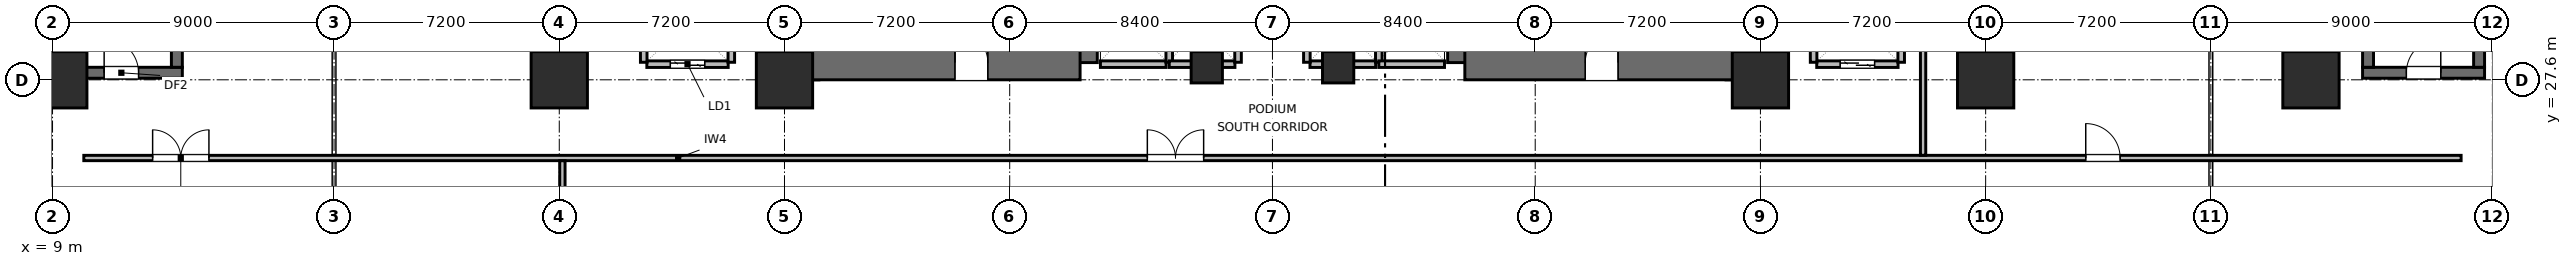
"""IFC4 building model, lengths in metres.
Left out: names, types, materials, properties, quantities, classifications, styles, units other than length and angle.
Written with IfcOpenShell. Run it as: python <this file> out.ifc"""

import sys

from ifc_helpers import new_model, si_unit, direction, frame, frame_2d, origin, origin_2d, place, context, subcontext, project, spatial, rectangle, extrude, element, fill, save


model = new_model("IFC4")
c1 = context("Model", 3, precision=1e-05, world=origin(), true_north=direction((0.0, 1.0)))
c2 = subcontext(c1, "Body", "Model", "MODEL_VIEW")
j1 = project(units=[si_unit("LENGTHUNIT", "METRE"), si_unit("PLANEANGLEUNIT", "RADIAN")], contexts=[c1])
p1 = place(None, origin())
s1 = spatial("IfcSite", under=j1, at=p1, CompositionType="ELEMENT")
p2 = place(p1, origin())
s2 = spatial("IfcBuilding", under=s1, at=p2, CompositionType="ELEMENT")
p3 = place(p2, frame((0.0, 0.0, 12.9)))
s3 = spatial("IfcBuildingStorey", under=s2, at=p3, CompositionType="ELEMENT", Elevation=12.9)
p4 = place(p3, frame((32.95, 27.6, 0.0), z_axis=(0.0, 0.0, 1.0), x_axis=(0.0, 1.0, 0.0)))
e1 = element("IfcWall", 1, at=p4, inside=s3, PredefinedType="SHEAR", context=c2, shape_type="SweptSolid", body=[
    extrude(rectangle(XDim=16.8, YDim=1.1, at=frame_2d((8.4, 0.0))), origin(), (0.0, 0.0, 1.0), 4.2),
])
p5 = place(p3, frame((41.85, 28.15, 0.0), z_axis=(0.0, 0.0, 1.0), x_axis=(0.0, 1.0, 0.0)))
e2 = element("IfcWall", 2, at=p5, inside=s3, PredefinedType="SHEAR", context=c2, shape_type="SweptSolid", body=[
    extrude(rectangle(XDim=6.25, YDim=1.1, at=frame_2d((3.125, 0.0))), origin(), (0.0, 0.0, 1.0), 4.2),
])
p6 = place(p3, frame((32.95, 28.15, 0.0), z_axis=(0.0, 0.0, 1.0), x_axis=(1.0, 0.0, 0.0)))
e3 = element("IfcWall", 3, at=p6, inside=s3, PredefinedType="SHEAR", context=c2, shape_type="SweptSolid", body=[
    extrude(rectangle(XDim=8.9, YDim=1.1, at=frame_2d((4.45, 0.0))), origin(), (0.0, 0.0, 1.0), 4.2),
])
p7 = place(p6, frame((4.9, 0.0, 0.0)))
e4 = element("IfcOpeningElement", 4, at=p7, cuts=e3, PredefinedType="OPENING", context=c2, shape_type="SweptSolid", body=[
    extrude(rectangle(XDim=1.05, YDim=2.04, at=frame_2d((0.525, 1.02))), frame((0.0, 0.56, 0.0), z_axis=(0.0, -1.0, 0.0), x_axis=(1.0, 0.0, 0.0)), (0.0, 0.0, 1.0), 1.12),
])
p8 = place(p3, frame((54.15, 28.15, 0.0), z_axis=(0.0, 0.0, 1.0), x_axis=(0.0, 1.0, 0.0)))
e5 = element("IfcWall", 5, at=p8, inside=s3, PredefinedType="SHEAR", context=c2, shape_type="SweptSolid", body=[
    extrude(rectangle(XDim=7.65, YDim=1.1, at=frame_2d((3.825, 0.0))), origin(), (0.0, 0.0, 1.0), 4.2),
])
p9 = place(p3, frame((63.05, 27.6, 0.0), z_axis=(0.0, 0.0, 1.0), x_axis=(0.0, 1.0, 0.0)))
e6 = element("IfcWall", 6, at=p9, inside=s3, PredefinedType="SHEAR", context=c2, shape_type="SweptSolid", body=[
    extrude(rectangle(XDim=16.8, YDim=1.1, at=frame_2d((8.4, 0.0))), origin(), (0.0, 0.0, 1.0), 4.2),
])
p10 = place(p3, frame((54.15, 28.15, 0.0), z_axis=(0.0, 0.0, 1.0), x_axis=(1.0, 0.0, 0.0)))
e7 = element("IfcWall", 7, at=p10, inside=s3, PredefinedType="SHEAR", context=c2, shape_type="SweptSolid", body=[
    extrude(rectangle(XDim=8.9, YDim=1.1, at=frame_2d((4.45, 0.0))), origin(), (0.0, 0.0, 1.0), 4.2),
])
p11 = place(p10, frame((3.85, 0.0, 0.0)))
e8 = element("IfcOpeningElement", 8, at=p11, cuts=e7, PredefinedType="OPENING", context=c2, shape_type="SweptSolid", body=[
    extrude(rectangle(XDim=1.05, YDim=2.04, at=frame_2d((0.525, 1.02))), frame((0.0, 0.56, 0.0), z_axis=(0.0, -1.0, 0.0), x_axis=(1.0, 0.0, 0.0)), (0.0, 0.0, 1.0), 1.12),
])
p12 = place(p3, frame((9.25, 27.825, 0.0), z_axis=(0.0, 0.0, 1.0), x_axis=(1.0, 0.0, 0.0)))
e9 = element("IfcWall", 9, at=p12, inside=s3, PredefinedType="SHEAR", context=c2, shape_type="SweptSolid", body=[
    extrude(rectangle(XDim=3.9, YDim=0.35, at=frame_2d((1.95, 0.0))), origin(), (0.0, 0.0, 1.0), 4.2),
])
p13 = place(p12, frame((1.4, 0.0, 0.0)))
e10 = element("IfcOpeningElement", 10, at=p13, cuts=e9, PredefinedType="OPENING", context=c2, shape_type="SweptSolid", body=[
    extrude(rectangle(XDim=1.1, YDim=2.05, at=frame_2d((0.55, 1.025))), frame((0.0, 0.185, 0.0), z_axis=(0.0, -1.0, 0.0), x_axis=(1.0, 0.0, 0.0)), (0.0, 0.0, 1.0), 0.37),
])
for number, where, z_axis, x_axis in (
    (11, (9.425, 28.0, 0.0), (0.0, 0.0, 1.0), (0.0, 1.0, 0.0)),
    (12, (12.975, 28.0, 0.0), (0.0, 0.0, 1.0), (0.0, 1.0, 0.0)),
):
    element("IfcWall", number, at=place(p3, frame(where, z_axis=z_axis, x_axis=x_axis)), inside=s3, PredefinedType="SHEAR", context=c2, shape_type="SweptSolid", body=[
        extrude(rectangle(XDim=8.4, YDim=0.35, at=frame_2d((4.2, 0.0))), origin(), (0.0, 0.0, 1.0), 4.2),
    ])
p14 = place(p3, frame((82.85, 27.825, 0.0), z_axis=(0.0, 0.0, 1.0), x_axis=(1.0, 0.0, 0.0)))
e13 = element("IfcWall", 13, at=p14, inside=s3, PredefinedType="SHEAR", context=c2, shape_type="SweptSolid", body=[
    extrude(rectangle(XDim=3.9, YDim=0.35, at=frame_2d((1.95, 0.0))), origin(), (0.0, 0.0, 1.0), 4.2),
])
p15 = place(p14, frame((1.4, 0.0, 0.0)))
e14 = element("IfcOpeningElement", 14, at=p15, cuts=e13, PredefinedType="OPENING", context=c2, shape_type="SweptSolid", body=[
    extrude(rectangle(XDim=1.1, YDim=2.05, at=frame_2d((0.55, 1.025))), frame((0.0, 0.185, 0.0), z_axis=(0.0, -1.0, 0.0), x_axis=(1.0, 0.0, 0.0)), (0.0, 0.0, 1.0), 0.37),
])
for number, where, z_axis, x_axis in (
    (15, (83.025, 28.0, 0.0), (0.0, 0.0, 1.0), (0.0, 1.0, 0.0)),
    (16, (86.575, 28.0, 0.0), (0.0, 0.0, 1.0), (0.0, 1.0, 0.0)),
):
    element("IfcWall", number, at=place(p3, frame(where, z_axis=z_axis, x_axis=x_axis)), inside=s3, PredefinedType="SHEAR", context=c2, shape_type="SweptSolid", body=[
        extrude(rectangle(XDim=8.4, YDim=0.35, at=frame_2d((4.2, 0.0))), origin(), (0.0, 0.0, 1.0), 4.2),
    ])
for number, where, z_axis, x_axis in (
    (17, (9.2, 27.6, 0.0), (0.0, 0.0, 1.0), (1.0, 0.0, 0.0)),
    (18, (25.2, 27.6, 0.0), (0.0, 0.0, 1.0), (1.0, 0.0, 0.0)),
    (19, (32.4, 27.6, 0.0), (0.0, 0.0, 1.0), (1.0, 0.0, 0.0)),
    (20, (63.6, 27.6, 0.0), (0.0, 0.0, 1.0), (1.0, 0.0, 0.0)),
    (21, (70.8, 27.6, 0.0), (0.0, 0.0, 1.0), (1.0, 0.0, 0.0)),
    (22, (81.2, 27.6, 0.0), (0.0, 0.0, 1.0), (1.0, 0.0, 0.0)),
):
    element("IfcColumn", number, at=place(p3, frame(where, z_axis=z_axis, x_axis=x_axis)), inside=s3, PredefinedType="COLUMN", context=c2, shape_type="SweptSolid", body=[
        extrude(rectangle(XDim=1.8, YDim=1.8, at=origin_2d()), origin(), (0.0, 0.0, 1.0), 4.2),
    ])
for number, where, z_axis, x_axis in (
    (23, (45.9, 28.0, 0.0), (0.0, 0.0, 1.0), (1.0, 0.0, 0.0)),
    (24, (50.1, 28.0, 0.0), (0.0, 0.0, 1.0), (1.0, 0.0, 0.0)),
):
    element("IfcColumn", number, at=place(p3, frame(where, z_axis=z_axis, x_axis=x_axis)), inside=s3, PredefinedType="COLUMN", context=c2, shape_type="SweptSolid", body=[
        extrude(rectangle(XDim=1.0, YDim=1.0, at=origin_2d()), origin(), (0.0, 0.0, 1.0), 4.2),
    ])
p16 = place(p3, frame((42.5, 28.1, 0.0), z_axis=(0.0, 0.0, 1.0), x_axis=(1.0, 0.0, 0.0)))
e25 = element("IfcWall", 25, at=p16, inside=s3, PredefinedType="PARTITIONING", context=c2, shape_type="SweptSolid", body=[
    extrude(rectangle(XDim=2.1, YDim=0.21, at=frame_2d((1.05, 0.0))), origin(), (0.0, 0.0, 1.0), 2.725),
])
p17 = place(p3, frame((44.7, 28.16, 0.0), z_axis=(0.0, 0.0, 1.0), x_axis=(0.0, 1.0, 0.0)))
e26 = element("IfcWall", 26, at=p17, inside=s3, PredefinedType="PARTITIONING", context=c2, shape_type="SweptSolid", body=[
    extrude(rectangle(XDim=2.28, YDim=0.21, at=frame_2d((1.14, 0.0))), origin(), (0.0, 0.0, 1.0), 3.84),
])
p18 = place(p3, frame((44.7, 28.1, 0.0), z_axis=(0.0, 0.0, 1.0), x_axis=(1.0, 0.0, 0.0)))
e27 = element("IfcWall", 27, at=p18, inside=s3, PredefinedType="PARTITIONING", context=c2, shape_type="SweptSolid", body=[
    extrude(rectangle(XDim=2.1, YDim=0.21, at=frame_2d((1.05, 0.0))), origin(), (0.0, 0.0, 1.0), 2.725),
])
p19 = place(p3, frame((46.9, 28.16, 0.0), z_axis=(0.0, 0.0, 1.0), x_axis=(0.0, 1.0, 0.0)))
e28 = element("IfcWall", 28, at=p19, inside=s3, PredefinedType="PARTITIONING", context=c2, shape_type="SweptSolid", body=[
    extrude(rectangle(XDim=2.28, YDim=0.21, at=frame_2d((1.14, 0.0))), origin(), (0.0, 0.0, 1.0), 3.84),
])
p20 = place(p3, frame((49.2, 28.1, 0.0), z_axis=(0.0, 0.0, 1.0), x_axis=(1.0, 0.0, 0.0)))
e29 = element("IfcWall", 29, at=p20, inside=s3, PredefinedType="PARTITIONING", context=c2, shape_type="SweptSolid", body=[
    extrude(rectangle(XDim=2.1, YDim=0.21, at=frame_2d((1.05, 0.0))), origin(), (0.0, 0.0, 1.0), 2.725),
])
for number, where, z_axis, x_axis in (
    (30, (49.1, 28.16, 0.0), (0.0, 0.0, 1.0), (0.0, 1.0, 0.0)),
    (31, (51.4, 28.16, 0.0), (0.0, 0.0, 1.0), (0.0, 1.0, 0.0)),
):
    element("IfcWall", number, at=place(p3, frame(where, z_axis=z_axis, x_axis=x_axis)), inside=s3, PredefinedType="PARTITIONING", context=c2, shape_type="SweptSolid", body=[
        extrude(rectangle(XDim=2.28, YDim=0.21, at=frame_2d((1.14, 0.0))), origin(), (0.0, 0.0, 1.0), 3.84),
    ])
p21 = place(p3, frame((51.4, 28.1, 0.0), z_axis=(0.0, 0.0, 1.0), x_axis=(1.0, 0.0, 0.0)))
e32 = element("IfcWall", 32, at=p21, inside=s3, PredefinedType="PARTITIONING", context=c2, shape_type="SweptSolid", body=[
    extrude(rectangle(XDim=2.1, YDim=0.21, at=frame_2d((1.05, 0.0))), origin(), (0.0, 0.0, 1.0), 2.725),
])
p22 = place(p3, frame((28.0, 28.1, 0.0), z_axis=(0.0, 0.0, 1.0), x_axis=(1.0, 0.0, 0.0)))
e33 = element("IfcWall", 33, at=p22, inside=s3, PredefinedType="PARTITIONING", context=c2, shape_type="SweptSolid", body=[
    extrude(rectangle(XDim=2.6, YDim=0.21, at=frame_2d((1.3, 0.0))), origin(), (0.0, 0.0, 1.0), 3.84),
])
p23 = place(p22, frame((0.75, 0.0, 0.0)))
e34 = element("IfcOpeningElement", 34, at=p23, cuts=e33, PredefinedType="OPENING", context=c2, shape_type="SweptSolid", body=[
    extrude(rectangle(XDim=1.1, YDim=2.04, at=frame_2d((0.55, 1.02))), frame((0.0, 0.115, 0.0), z_axis=(0.0, -1.0, 0.0), x_axis=(1.0, 0.0, 0.0)), (0.0, 0.0, 1.0), 0.23),
])
for number, where, z_axis, x_axis in (
    (35, (27.9, 28.16, 0.0), (0.0, 0.0, 1.0), (0.0, 1.0, 0.0)),
    (36, (30.7, 28.16, 0.0), (0.0, 0.0, 1.0), (0.0, 1.0, 0.0)),
):
    element("IfcWall", number, at=place(p3, frame(where, z_axis=z_axis, x_axis=x_axis)), inside=s3, PredefinedType="PARTITIONING", context=c2, shape_type="SweptSolid", body=[
        extrude(rectangle(XDim=2.48, YDim=0.21, at=frame_2d((1.24, 0.0))), origin(), (0.0, 0.0, 1.0), 3.84),
    ])
p24 = place(p3, frame((65.4, 28.1, 0.0), z_axis=(0.0, 0.0, 1.0), x_axis=(1.0, 0.0, 0.0)))
e37 = element("IfcWall", 37, at=p24, inside=s3, PredefinedType="PARTITIONING", context=c2, shape_type="SweptSolid", body=[
    extrude(rectangle(XDim=2.6, YDim=0.21, at=frame_2d((1.3, 0.0))), origin(), (0.0, 0.0, 1.0), 3.84),
])
p25 = place(p24, frame((0.75, 0.0, 0.0)))
e38 = element("IfcOpeningElement", 38, at=p25, cuts=e37, PredefinedType="OPENING", context=c2, shape_type="SweptSolid", body=[
    extrude(rectangle(XDim=1.1, YDim=2.04, at=frame_2d((0.55, 1.02))), frame((0.0, 0.115, 0.0), z_axis=(0.0, -1.0, 0.0), x_axis=(1.0, 0.0, 0.0)), (0.0, 0.0, 1.0), 0.23),
])
for number, where, z_axis, x_axis in (
    (39, (65.3, 28.16, 0.0), (0.0, 0.0, 1.0), (0.0, 1.0, 0.0)),
    (40, (68.1, 28.16, 0.0), (0.0, 0.0, 1.0), (0.0, 1.0, 0.0)),
):
    element("IfcWall", number, at=place(p3, frame(where, z_axis=z_axis, x_axis=x_axis)), inside=s3, PredefinedType="PARTITIONING", context=c2, shape_type="SweptSolid", body=[
        extrude(rectangle(XDim=2.48, YDim=0.21, at=frame_2d((1.24, 0.0))), origin(), (0.0, 0.0, 1.0), 3.84),
    ])
p26 = place(p3, frame((10.0, 25.1, 0.0), z_axis=(0.0, 0.0, 1.0), x_axis=(1.0, 0.0, 0.0)))
e41 = element("IfcWall", 41, at=p26, inside=s3, PredefinedType="PARTITIONING", context=c2, shape_type="SweptSolid", body=[
    extrude(rectangle(XDim=76.0, YDim=0.17, at=frame_2d((38.0, 0.0))), origin(), (0.0, 0.0, 1.0), 3.84),
])
p27 = place(p26, frame((2.2, 0.0, 0.0)))
e42 = element("IfcOpeningElement", 42, at=p27, cuts=e41, PredefinedType="OPENING", context=c2, shape_type="SweptSolid", body=[
    extrude(rectangle(XDim=1.8, YDim=2.06, at=frame_2d((0.9, 1.03))), frame((0.0, 0.095, 0.0), z_axis=(0.0, -1.0, 0.0), x_axis=(1.0, 0.0, 0.0)), (0.0, 0.0, 1.0), 0.19),
])
p28 = place(p26, frame((34.0, 0.0, 0.0)))
e43 = element("IfcOpeningElement", 43, at=p28, cuts=e41, PredefinedType="OPENING", context=c2, shape_type="SweptSolid", body=[
    extrude(rectangle(XDim=1.8, YDim=2.06, at=frame_2d((0.9, 1.03))), frame((0.0, 0.095, 0.0), z_axis=(0.0, -1.0, 0.0), x_axis=(1.0, 0.0, 0.0)), (0.0, 0.0, 1.0), 0.19),
])
p29 = place(p26, frame((64.0, 0.0, 0.0)))
e44 = element("IfcOpeningElement", 44, at=p29, cuts=e41, PredefinedType="OPENING", context=c2, shape_type="SweptSolid", body=[
    extrude(rectangle(XDim=1.1, YDim=2.05, at=frame_2d((0.55, 1.025))), frame((0.0, 0.095, 0.0), z_axis=(0.0, -1.0, 0.0), x_axis=(1.0, 0.0, 0.0)), (0.0, 0.0, 1.0), 0.19),
])
p30 = place(p3, frame((68.8, 25.187, 0.0), z_axis=(0.0, 0.0, 1.0), x_axis=(0.0, 1.0, 0.0)))
e45 = element("IfcWall", 45, at=p30, inside=s3, PredefinedType="PARTITIONING", context=c2, shape_type="SweptSolid", body=[
    extrude(rectangle(XDim=46.448, YDim=0.17, at=frame_2d((23.224, 0.0))), origin(), (0.0, 0.0, 1.0), 3.84),
])
p31 = place(p30, frame((15.913, 0.0, 0.0)))
e46 = element("IfcOpeningElement", 46, at=p31, cuts=e45, PredefinedType="OPENING", context=c2, shape_type="SweptSolid", body=[
    extrude(rectangle(XDim=1.1, YDim=2.05, at=frame_2d((0.55, 1.025))), frame((0.0, 0.095, 0.0), z_axis=(0.0, -1.0, 0.0), x_axis=(1.0, 0.0, 0.0)), (0.0, 0.0, 1.0), 0.19),
])
p32 = place(p3, frame((25.3, 0.355, 0.0), z_axis=(0.0, 0.0, 1.0), x_axis=(0.0, 1.0, 0.0)))
e47 = element("IfcWall", 47, at=p32, inside=s3, PredefinedType="PARTITIONING", context=c2, shape_type="SweptSolid", body=[
    extrude(rectangle(XDim=24.658, YDim=0.17, at=frame_2d((12.329, 0.0))), origin(), (0.0, 0.0, 1.0), 3.052),
])
p33 = place(p13, origin())
e48 = element("IfcDoor", 48, at=p33, inside=s3, OperationType="SINGLE_SWING_LEFT", PredefinedType="DOOR", context=c2, shape_type="SweptSolid", body=[
    extrude(rectangle(XDim=1.1, YDim=2.05, at=frame_2d((0.55, 1.025))), frame((0.0, 0.025, 0.0), z_axis=(0.0, -1.0, 0.0), x_axis=(1.0, 0.0, 0.0)), (0.0, 0.0, 1.0), 0.05),
])
fill(e10, e48)
p34 = place(p15, origin())
e49 = element("IfcDoor", 49, at=p34, inside=s3, OperationType="SINGLE_SWING_RIGHT", PredefinedType="DOOR", context=c2, shape_type="SweptSolid", body=[
    extrude(rectangle(XDim=1.1, YDim=2.05, at=frame_2d((0.55, 1.025))), frame((0.0, 0.025, 0.0), z_axis=(0.0, -1.0, 0.0), x_axis=(1.0, 0.0, 0.0)), (0.0, 0.0, 1.0), 0.05),
])
fill(e14, e49)
p35 = place(p23, origin())
e50 = element("IfcDoor", 50, at=p35, inside=s3, OperationType="DOUBLE_DOOR_SLIDING", PredefinedType="DOOR", context=c2, shape_type="SweptSolid", body=[
    extrude(rectangle(XDim=1.1, YDim=2.04, at=frame_2d((0.55, 1.02))), frame((0.0, 0.025, 0.0), z_axis=(0.0, -1.0, 0.0), x_axis=(1.0, 0.0, 0.0)), (0.0, 0.0, 1.0), 0.05),
])
fill(e34, e50)
p36 = place(p25, origin())
e51 = element("IfcDoor", 51, at=p36, inside=s3, OperationType="DOUBLE_DOOR_SLIDING", PredefinedType="DOOR", context=c2, shape_type="SweptSolid", body=[
    extrude(rectangle(XDim=1.1, YDim=2.04, at=frame_2d((0.55, 1.02))), frame((0.0, 0.025, 0.0), z_axis=(0.0, -1.0, 0.0), x_axis=(1.0, 0.0, 0.0)), (0.0, 0.0, 1.0), 0.05),
])
fill(e38, e51)
p37 = place(p7, origin())
e52 = element("IfcDoor", 52, at=p37, inside=s3, OperationType="SINGLE_SWING_LEFT", PredefinedType="DOOR", context=c2, shape_type="SweptSolid", body=[
    extrude(rectangle(XDim=1.05, YDim=2.04, at=frame_2d((0.525, 1.02))), frame((0.0, 0.025, 0.0), z_axis=(0.0, -1.0, 0.0), x_axis=(1.0, 0.0, 0.0)), (0.0, 0.0, 1.0), 0.05),
])
fill(e4, e52)
p38 = place(p11, origin())
e53 = element("IfcDoor", 53, at=p38, inside=s3, OperationType="SINGLE_SWING_RIGHT", PredefinedType="DOOR", context=c2, shape_type="SweptSolid", body=[
    extrude(rectangle(XDim=1.05, YDim=2.04, at=frame_2d((0.525, 1.02))), frame((0.0, 0.025, 0.0), z_axis=(0.0, -1.0, 0.0), x_axis=(1.0, 0.0, 0.0)), (0.0, 0.0, 1.0), 0.05),
])
fill(e8, e53)
p39 = place(p27, origin())
e54 = element("IfcDoor", 54, at=p39, inside=s3, OperationType="DOUBLE_DOOR_SINGLE_SWING", PredefinedType="DOOR", context=c2, shape_type="SweptSolid", body=[
    extrude(rectangle(XDim=1.8, YDim=2.06, at=frame_2d((0.9, 1.03))), frame((0.0, 0.025, 0.0), z_axis=(0.0, -1.0, 0.0), x_axis=(1.0, 0.0, 0.0)), (0.0, 0.0, 1.0), 0.05),
])
fill(e42, e54)
p40 = place(p28, origin())
e55 = element("IfcDoor", 55, at=p40, inside=s3, OperationType="DOUBLE_DOOR_SINGLE_SWING", PredefinedType="DOOR", context=c2, shape_type="SweptSolid", body=[
    extrude(rectangle(XDim=1.8, YDim=2.06, at=frame_2d((0.9, 1.03))), frame((0.0, 0.025, 0.0), z_axis=(0.0, -1.0, 0.0), x_axis=(1.0, 0.0, 0.0)), (0.0, 0.0, 1.0), 0.05),
])
fill(e43, e55)
p41 = place(p29, origin())
e56 = element("IfcDoor", 56, at=p41, inside=s3, OperationType="SINGLE_SWING_LEFT", PredefinedType="DOOR", context=c2, shape_type="SweptSolid", body=[
    extrude(rectangle(XDim=1.1, YDim=2.05, at=frame_2d((0.55, 1.025))), frame((0.0, 0.025, 0.0), z_axis=(0.0, -1.0, 0.0), x_axis=(1.0, 0.0, 0.0)), (0.0, 0.0, 1.0), 0.05),
])
fill(e44, e56)
save(model, sys.argv[1])
